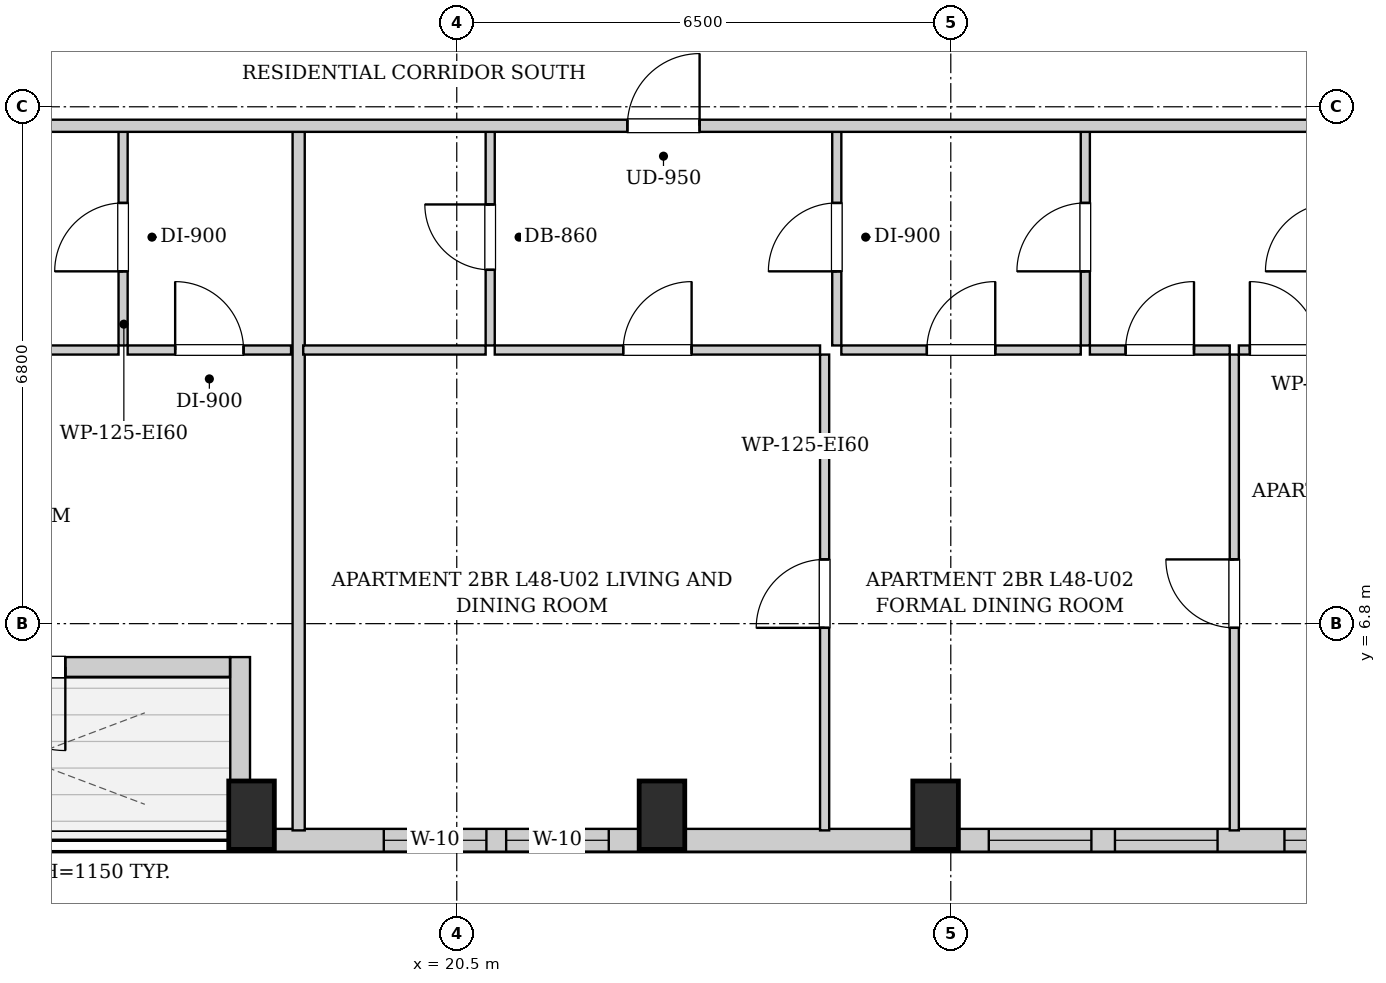
"""IFC4 building model, lengths in metres.
Left out: names, types, materials, properties, quantities, classifications, styles, units other than length and angle.
Written with IfcOpenShell. Run it as: python <this file> out.ifc"""

import sys

from ifc_helpers import new_model, si_unit, direction, frame, frame_2d, origin, origin_2d, place, context, subcontext, project, spatial, rectangle, extrude, element, fill, save


model = new_model("IFC4")
c1 = context("Model", 3, precision=1e-05, world=origin(), true_north=direction((0.0, 1.0)))
c2 = subcontext(c1, "Body", "Model", "MODEL_VIEW")
j1 = project(units=[si_unit("LENGTHUNIT", "METRE"), si_unit("PLANEANGLEUNIT", "RADIAN")], contexts=[c1])
p1 = place(None, origin())
s1 = spatial("IfcSite", under=j1, at=p1, CompositionType="ELEMENT")
p2 = place(p1, origin())
s2 = spatial("IfcBuilding", under=s1, at=p2, CompositionType="ELEMENT")
p3 = place(p2, frame((0.0, 0.0, 166.65)))
s3 = spatial("IfcBuildingStorey", under=s2, at=p3, CompositionType="ELEMENT", Elevation=166.65)
for number, where, z_axis, x_axis in (
    (1, (17.8, 4.28, 0.0), (0.0, 0.0, 1.0), (1.0, 0.0, 0.0)),
    (2, (23.2, 4.28, 0.0), (0.0, 0.0, 1.0), (1.0, 0.0, 0.0)),
    (3, (26.8, 4.28, 0.0), (0.0, 0.0, 1.0), (1.0, 0.0, 0.0)),
):
    element("IfcColumn", number, at=place(p3, frame(where, z_axis=z_axis, x_axis=x_axis)), inside=s3, PredefinedType="COLUMN", context=c2, shape_type="SweptSolid", body=[
        extrude(rectangle(XDim=0.6, YDim=0.9, at=origin_2d()), origin(), (0.0, 0.0, 1.0), 3.25),
    ])
p4 = place(p3, frame((37.8, 3.95, 0.0), z_axis=(0.0, 0.0, 1.0), x_axis=(-1.0, 0.0, 0.0)))
e4 = element("IfcWall", 4, at=p4, inside=s3, PredefinedType="SOLIDWALL", context=c2, shape_type="SweptSolid", body=[
    extrude(rectangle(XDim=20.15, YDim=0.3, at=frame_2d((10.075, 0.0))), origin(), (0.0, 0.0, 1.0), 2.93),
])
p5 = place(p4, frame((15.3, 0.0, 0.55)))
e5 = element("IfcOpeningElement", 5, at=p5, cuts=e4, PredefinedType="OPENING", context=c2, shape_type="SweptSolid", body=[
    extrude(rectangle(XDim=1.35, YDim=1.2, at=frame_2d((0.675, 0.6))), frame((0.0, 0.16, 0.0), z_axis=(0.0, -1.0, 0.0), x_axis=(1.0, 0.0, 0.0)), (0.0, 0.0, 1.0), 0.32),
])
p6 = place(p4, frame((16.91, 0.0, 0.55)))
e6 = element("IfcOpeningElement", 6, at=p6, cuts=e4, PredefinedType="OPENING", context=c2, shape_type="SweptSolid", body=[
    extrude(rectangle(XDim=1.35, YDim=1.2, at=frame_2d((0.675, 0.6))), frame((0.0, 0.16, 0.0), z_axis=(0.0, -1.0, 0.0), x_axis=(1.0, 0.0, 0.0)), (0.0, 0.0, 1.0), 0.32),
])
p7 = place(p4, frame((8.95, 0.0, 0.55)))
e7 = element("IfcOpeningElement", 7, at=p7, cuts=e4, PredefinedType="OPENING", context=c2, shape_type="SweptSolid", body=[
    extrude(rectangle(XDim=1.35, YDim=1.2, at=frame_2d((0.675, 0.6))), frame((0.0, 0.16, 0.0), z_axis=(0.0, -1.0, 0.0), x_axis=(1.0, 0.0, 0.0)), (0.0, 0.0, 1.0), 0.32),
])
p8 = place(p4, frame((7.29, 0.0, 0.55)))
e8 = element("IfcOpeningElement", 8, at=p8, cuts=e4, PredefinedType="OPENING", context=c2, shape_type="SweptSolid", body=[
    extrude(rectangle(XDim=1.35, YDim=1.2, at=frame_2d((0.675, 0.6))), frame((0.0, 0.16, 0.0), z_axis=(0.0, -1.0, 0.0), x_axis=(1.0, 0.0, 0.0)), (0.0, 0.0, 1.0), 0.32),
])
p9 = place(p4, frame((5.06, 0.0, 0.55)))
e9 = element("IfcOpeningElement", 9, at=p9, cuts=e4, PredefinedType="OPENING", context=c2, shape_type="SweptSolid", body=[
    extrude(rectangle(XDim=1.35, YDim=1.2, at=frame_2d((0.675, 0.6))), frame((0.0, 0.16, 0.0), z_axis=(0.0, -1.0, 0.0), x_axis=(1.0, 0.0, 0.0)), (0.0, 0.0, 1.0), 0.32),
])
p10 = place(p3, frame((17.65, 3.96, 0.0), z_axis=(0.0, 0.0, 1.0), x_axis=(0.0, 1.0, 0.0)))
e10 = element("IfcWall", 10, at=p10, inside=s3, PredefinedType="SOLIDWALL", context=c2, shape_type="SweptSolid", body=[
    extrude(rectangle(XDim=2.4, YDim=0.26, at=frame_2d((1.2, 0.0))), origin(), (0.0, 0.0, 1.0), 2.93),
])
p11 = place(p3, frame((17.516, 6.23, 0.0), z_axis=(0.0, 0.0, 1.0), x_axis=(-1.0, 0.0, 0.0)))
e11 = element("IfcWall", 11, at=p11, inside=s3, PredefinedType="SOLIDWALL", context=c2, shape_type="SweptSolid", body=[
    extrude(rectangle(XDim=5.432, YDim=0.26, at=frame_2d((2.716, 0.0))), origin(), (0.0, 0.0, 1.0), 2.93),
])
p12 = place(p11, frame((2.166, 0.0, 0.0)))
e12 = element("IfcOpeningElement", 12, at=p12, cuts=e11, PredefinedType="OPENING", context=c2, shape_type="SweptSolid", body=[
    extrude(rectangle(XDim=1.1, YDim=2.0, at=frame_2d((0.55, 1.0))), frame((0.0, 0.14, 0.0), z_axis=(0.0, -1.0, 0.0), x_axis=(1.0, 0.0, 0.0)), (0.0, 0.0, 1.0), 0.28),
])
p13 = place(p3, frame((16.11, 10.46, 0.0), z_axis=(0.0, 0.0, 1.0), x_axis=(0.0, 1.0, 0.0)))
e13 = element("IfcWall", 13, at=p13, inside=s3, PredefinedType="PARTITIONING", context=c2, shape_type="SweptSolid", body=[
    extrude(rectangle(XDim=2.85, YDim=0.12, at=frame_2d((1.425, 0.0))), origin(), (0.0, 0.0, 1.0), 2.93),
])
p14 = place(p13, frame((0.975, 0.0, 0.0)))
e14 = element("IfcOpeningElement", 14, at=p14, cuts=e13, PredefinedType="OPENING", context=c2, shape_type="SweptSolid", body=[
    extrude(rectangle(XDim=0.9, YDim=2.05, at=frame_2d((0.45, 1.025))), frame((0.0, 0.07, 0.0), z_axis=(0.0, -1.0, 0.0), x_axis=(1.0, 0.0, 0.0)), (0.0, 0.0, 1.0), 0.14),
])
p15 = place(p3, frame((12.6, 10.4, 0.0), z_axis=(0.0, 0.0, 1.0), x_axis=(1.0, 0.0, 0.0)))
e15 = element("IfcWall", 15, at=p15, inside=s3, PredefinedType="PARTITIONING", context=c2, shape_type="SweptSolid", body=[
    extrude(rectangle(XDim=3.45, YDim=0.12, at=frame_2d((1.725, 0.0))), origin(), (0.0, 0.0, 1.0), 2.93),
])
p16 = place(p15, frame((1.275, 0.0, 0.0)))
e16 = element("IfcOpeningElement", 16, at=p16, cuts=e15, PredefinedType="OPENING", context=c2, shape_type="SweptSolid", body=[
    extrude(rectangle(XDim=0.9, YDim=2.05, at=frame_2d((0.45, 1.025))), frame((0.0, 0.07, 0.0), z_axis=(0.0, -1.0, 0.0), x_axis=(1.0, 0.0, 0.0)), (0.0, 0.0, 1.0), 0.14),
])
p17 = place(p3, frame((16.17, 10.4, 0.0), z_axis=(0.0, 0.0, 1.0), x_axis=(1.0, 0.0, 0.0)))
e17 = element("IfcWall", 17, at=p17, inside=s3, PredefinedType="PARTITIONING", context=c2, shape_type="SweptSolid", body=[
    extrude(rectangle(XDim=2.15, YDim=0.12, at=frame_2d((1.075, 0.0))), origin(), (0.0, 0.0, 1.0), 2.93),
])
p18 = place(p17, frame((0.625, 0.0, 0.0)))
e18 = element("IfcOpeningElement", 18, at=p18, cuts=e17, PredefinedType="OPENING", context=c2, shape_type="SweptSolid", body=[
    extrude(rectangle(XDim=0.9, YDim=2.05, at=frame_2d((0.45, 1.025))), frame((0.0, 0.07, 0.0), z_axis=(0.0, -1.0, 0.0), x_axis=(1.0, 0.0, 0.0)), (0.0, 0.0, 1.0), 0.14),
])
p19 = place(p3, frame((18.42, 4.08, 0.0), z_axis=(0.0, 0.0, 1.0), x_axis=(0.0, 1.0, 0.0)))
e19 = element("IfcWall", 19, at=p19, inside=s3, PredefinedType="PARTITIONING", context=c2, shape_type="SweptSolid", body=[
    extrude(rectangle(XDim=9.23, YDim=0.16, at=frame_2d((4.615, 0.0))), origin(), (0.0, 0.0, 1.0), 2.93),
])
p20 = place(p3, frame((20.94, 10.46, 0.0), z_axis=(0.0, 0.0, 1.0), x_axis=(0.0, 1.0, 0.0)))
e20 = element("IfcWall", 20, at=p20, inside=s3, PredefinedType="PARTITIONING", context=c2, shape_type="SweptSolid", body=[
    extrude(rectangle(XDim=2.85, YDim=0.12, at=frame_2d((1.425, 0.0))), origin(), (0.0, 0.0, 1.0), 2.93),
])
p21 = place(p20, frame((0.995, 0.0, 0.0)))
e21 = element("IfcOpeningElement", 21, at=p21, cuts=e20, PredefinedType="OPENING", context=c2, shape_type="SweptSolid", body=[
    extrude(rectangle(XDim=0.86, YDim=2.05, at=frame_2d((0.43, 1.025))), frame((0.0, 0.07, 0.0), z_axis=(0.0, -1.0, 0.0), x_axis=(1.0, 0.0, 0.0)), (0.0, 0.0, 1.0), 0.14),
])
p22 = place(p3, frame((18.48, 10.4, 0.0), z_axis=(0.0, 0.0, 1.0), x_axis=(1.0, 0.0, 0.0)))
e22 = element("IfcWall", 22, at=p22, inside=s3, PredefinedType="PARTITIONING", context=c2, shape_type="SweptSolid", body=[
    extrude(rectangle(XDim=2.4, YDim=0.12, at=frame_2d((1.2, 0.0))), origin(), (0.0, 0.0, 1.0), 2.93),
])
p23 = place(p3, frame((25.5, 10.46, 0.0), z_axis=(0.0, 0.0, 1.0), x_axis=(0.0, 1.0, 0.0)))
e23 = element("IfcWall", 23, at=p23, inside=s3, PredefinedType="PARTITIONING", context=c2, shape_type="SweptSolid", body=[
    extrude(rectangle(XDim=2.85, YDim=0.12, at=frame_2d((1.425, 0.0))), origin(), (0.0, 0.0, 1.0), 2.93),
])
p24 = place(p23, frame((0.975, 0.0, 0.0)))
e24 = element("IfcOpeningElement", 24, at=p24, cuts=e23, PredefinedType="OPENING", context=c2, shape_type="SweptSolid", body=[
    extrude(rectangle(XDim=0.9, YDim=2.05, at=frame_2d((0.45, 1.025))), frame((0.0, 0.07, 0.0), z_axis=(0.0, -1.0, 0.0), x_axis=(1.0, 0.0, 0.0)), (0.0, 0.0, 1.0), 0.14),
])
p25 = place(p3, frame((21.0, 10.4, 0.0), z_axis=(0.0, 0.0, 1.0), x_axis=(1.0, 0.0, 0.0)))
e25 = element("IfcWall", 25, at=p25, inside=s3, PredefinedType="PARTITIONING", context=c2, shape_type="SweptSolid", body=[
    extrude(rectangle(XDim=4.28, YDim=0.12, at=frame_2d((2.14, 0.0))), origin(), (0.0, 0.0, 1.0), 2.93),
])
p26 = place(p25, frame((1.69, 0.0, 0.0)))
e26 = element("IfcOpeningElement", 26, at=p26, cuts=e25, PredefinedType="OPENING", context=c2, shape_type="SweptSolid", body=[
    extrude(rectangle(XDim=0.9, YDim=2.05, at=frame_2d((0.45, 1.025))), frame((0.0, 0.07, 0.0), z_axis=(0.0, -1.0, 0.0), x_axis=(1.0, 0.0, 0.0)), (0.0, 0.0, 1.0), 0.14),
])
p27 = place(p3, frame((28.77, 10.46, 0.0), z_axis=(0.0, 0.0, 1.0), x_axis=(0.0, 1.0, 0.0)))
e27 = element("IfcWall", 27, at=p27, inside=s3, PredefinedType="PARTITIONING", context=c2, shape_type="SweptSolid", body=[
    extrude(rectangle(XDim=2.85, YDim=0.12, at=frame_2d((1.425, 0.0))), origin(), (0.0, 0.0, 1.0), 2.93),
])
p28 = place(p27, frame((0.975, 0.0, 0.0)))
e28 = element("IfcOpeningElement", 28, at=p28, cuts=e27, PredefinedType="OPENING", context=c2, shape_type="SweptSolid", body=[
    extrude(rectangle(XDim=0.9, YDim=2.05, at=frame_2d((0.45, 1.025))), frame((0.0, 0.07, 0.0), z_axis=(0.0, -1.0, 0.0), x_axis=(1.0, 0.0, 0.0)), (0.0, 0.0, 1.0), 0.14),
])
p29 = place(p3, frame((25.56, 10.4, 0.0), z_axis=(0.0, 0.0, 1.0), x_axis=(1.0, 0.0, 0.0)))
e29 = element("IfcWall", 29, at=p29, inside=s3, PredefinedType="PARTITIONING", context=c2, shape_type="SweptSolid", body=[
    extrude(rectangle(XDim=3.15, YDim=0.12, at=frame_2d((1.575, 0.0))), origin(), (0.0, 0.0, 1.0), 2.93),
])
p30 = place(p29, frame((1.125, 0.0, 0.0)))
e30 = element("IfcOpeningElement", 30, at=p30, cuts=e29, PredefinedType="OPENING", context=c2, shape_type="SweptSolid", body=[
    extrude(rectangle(XDim=0.9, YDim=2.05, at=frame_2d((0.45, 1.025))), frame((0.0, 0.07, 0.0), z_axis=(0.0, -1.0, 0.0), x_axis=(1.0, 0.0, 0.0)), (0.0, 0.0, 1.0), 0.14),
])
p31 = place(p3, frame((28.83, 10.4, 0.0), z_axis=(0.0, 0.0, 1.0), x_axis=(1.0, 0.0, 0.0)))
e31 = element("IfcWall", 31, at=p31, inside=s3, PredefinedType="PARTITIONING", context=c2, shape_type="SweptSolid", body=[
    extrude(rectangle(XDim=1.84, YDim=0.12, at=frame_2d((0.92, 0.0))), origin(), (0.0, 0.0, 1.0), 2.93),
])
p32 = place(p31, frame((0.47, 0.0, 0.0)))
e32 = element("IfcOpeningElement", 32, at=p32, cuts=e31, PredefinedType="OPENING", context=c2, shape_type="SweptSolid", body=[
    extrude(rectangle(XDim=0.9, YDim=2.05, at=frame_2d((0.45, 1.025))), frame((0.0, 0.07, 0.0), z_axis=(0.0, -1.0, 0.0), x_axis=(1.0, 0.0, 0.0)), (0.0, 0.0, 1.0), 0.14),
])
p33 = place(p3, frame((30.79, 10.4, 0.0), z_axis=(0.0, 0.0, 1.0), x_axis=(1.0, 0.0, 0.0)))
e33 = element("IfcWall", 33, at=p33, inside=s3, PredefinedType="PARTITIONING", context=c2, shape_type="SweptSolid", body=[
    extrude(rectangle(XDim=1.19, YDim=0.12, at=frame_2d((0.595, 0.0))), origin(), (0.0, 0.0, 1.0), 2.93),
])
p34 = place(p33, frame((0.145, 0.0, 0.0)))
e34 = element("IfcOpeningElement", 34, at=p34, cuts=e33, PredefinedType="OPENING", context=c2, shape_type="SweptSolid", body=[
    extrude(rectangle(XDim=0.9, YDim=2.05, at=frame_2d((0.45, 1.025))), frame((0.0, 0.07, 0.0), z_axis=(0.0, -1.0, 0.0), x_axis=(1.0, 0.0, 0.0)), (0.0, 0.0, 1.0), 0.14),
])
p35 = place(p3, frame((25.34, 4.08, 0.0), z_axis=(0.0, 0.0, 1.0), x_axis=(0.0, 1.0, 0.0)))
e35 = element("IfcWall", 35, at=p35, inside=s3, PredefinedType="PARTITIONING", context=c2, shape_type="SweptSolid", body=[
    extrude(rectangle(XDim=6.26, YDim=0.12, at=frame_2d((3.13, 0.0))), origin(), (0.0, 0.0, 1.0), 2.93),
])
p36 = place(p35, frame((2.665, 0.0, 0.0)))
e36 = element("IfcOpeningElement", 36, at=p36, cuts=e35, PredefinedType="OPENING", context=c2, shape_type="SweptSolid", body=[
    extrude(rectangle(XDim=0.9, YDim=2.05, at=frame_2d((0.45, 1.025))), frame((0.0, 0.07, 0.0), z_axis=(0.0, -1.0, 0.0), x_axis=(1.0, 0.0, 0.0)), (0.0, 0.0, 1.0), 0.14),
])
p37 = place(p3, frame((30.73, 4.08, 0.0), z_axis=(0.0, 0.0, 1.0), x_axis=(0.0, 1.0, 0.0)))
e37 = element("IfcWall", 37, at=p37, inside=s3, PredefinedType="PARTITIONING", context=c2, shape_type="SweptSolid", body=[
    extrude(rectangle(XDim=6.26, YDim=0.12, at=frame_2d((3.13, 0.0))), origin(), (0.0, 0.0, 1.0), 2.93),
])
p38 = place(p37, frame((2.665, 0.0, 0.0)))
e38 = element("IfcOpeningElement", 38, at=p38, cuts=e37, PredefinedType="OPENING", context=c2, shape_type="SweptSolid", body=[
    extrude(rectangle(XDim=0.9, YDim=2.05, at=frame_2d((0.45, 1.025))), frame((0.0, 0.07, 0.0), z_axis=(0.0, -1.0, 0.0), x_axis=(1.0, 0.0, 0.0)), (0.0, 0.0, 1.0), 0.14),
])
p39 = place(p3, frame((10.05, 13.35, 0.0), z_axis=(0.0, 0.0, 1.0), x_axis=(1.0, 0.0, 0.0)))
e39 = element("IfcWall", 39, at=p39, inside=s3, PredefinedType="PARTITIONING", context=c2, shape_type="SweptSolid", body=[
    extrude(rectangle(XDim=27.7, YDim=0.16, at=frame_2d((13.85, 0.0))), origin(), (0.0, 0.0, 1.0), 2.93),
])
p40 = place(p39, frame((3.8, 0.0, 0.0)))
e40 = element("IfcOpeningElement", 40, at=p40, cuts=e39, PredefinedType="OPENING", context=c2, shape_type="SweptSolid", body=[
    extrude(rectangle(XDim=0.95, YDim=2.1, at=frame_2d((0.475, 1.05))), frame((0.0, 0.09, 0.0), z_axis=(0.0, -1.0, 0.0), x_axis=(1.0, 0.0, 0.0)), (0.0, 0.0, 1.0), 0.18),
])
p41 = place(p39, frame((12.695, 0.0, 0.0)))
e41 = element("IfcOpeningElement", 41, at=p41, cuts=e39, PredefinedType="OPENING", context=c2, shape_type="SweptSolid", body=[
    extrude(rectangle(XDim=0.95, YDim=2.1, at=frame_2d((0.475, 1.05))), frame((0.0, 0.09, 0.0), z_axis=(0.0, -1.0, 0.0), x_axis=(1.0, 0.0, 0.0)), (0.0, 0.0, 1.0), 0.18),
])
p42 = place(p14, origin())
e42 = element("IfcDoor", 42, at=p42, inside=s3, OperationType="SINGLE_SWING_LEFT", PredefinedType="DOOR", context=c2, shape_type="SweptSolid", body=[
    extrude(rectangle(XDim=0.9, YDim=2.05, at=frame_2d((0.45, 1.025))), frame((0.0, 0.025, 0.0), z_axis=(0.0, -1.0, 0.0), x_axis=(1.0, 0.0, 0.0)), (0.0, 0.0, 1.0), 0.05),
])
fill(e14, e42)
p43 = place(p18, origin())
e43 = element("IfcDoor", 43, at=p43, inside=s3, OperationType="SINGLE_SWING_LEFT", PredefinedType="DOOR", context=c2, shape_type="SweptSolid", body=[
    extrude(rectangle(XDim=0.9, YDim=2.05, at=frame_2d((0.45, 1.025))), frame((0.0, 0.025, 0.0), z_axis=(0.0, -1.0, 0.0), x_axis=(1.0, 0.0, 0.0)), (0.0, 0.0, 1.0), 0.05),
])
fill(e18, e43)
p44 = place(p21, origin())
e44 = element("IfcDoor", 44, at=p44, inside=s3, OperationType="SINGLE_SWING_RIGHT", PredefinedType="DOOR", context=c2, shape_type="SweptSolid", body=[
    extrude(rectangle(XDim=0.86, YDim=2.05, at=frame_2d((0.43, 1.025))), frame((0.0, 0.025, 0.0), z_axis=(0.0, -1.0, 0.0), x_axis=(1.0, 0.0, 0.0)), (0.0, 0.0, 1.0), 0.05),
])
fill(e21, e44)
p45 = place(p24, origin())
e45 = element("IfcDoor", 45, at=p45, inside=s3, OperationType="SINGLE_SWING_LEFT", PredefinedType="DOOR", context=c2, shape_type="SweptSolid", body=[
    extrude(rectangle(XDim=0.9, YDim=2.05, at=frame_2d((0.45, 1.025))), frame((0.0, 0.025, 0.0), z_axis=(0.0, -1.0, 0.0), x_axis=(1.0, 0.0, 0.0)), (0.0, 0.0, 1.0), 0.05),
])
fill(e24, e45)
p46 = place(p26, origin())
e46 = element("IfcDoor", 46, at=p46, inside=s3, OperationType="SINGLE_SWING_RIGHT", PredefinedType="DOOR", context=c2, shape_type="SweptSolid", body=[
    extrude(rectangle(XDim=0.9, YDim=2.05, at=frame_2d((0.45, 1.025))), frame((0.0, 0.025, 0.0), z_axis=(0.0, -1.0, 0.0), x_axis=(1.0, 0.0, 0.0)), (0.0, 0.0, 1.0), 0.05),
])
fill(e26, e46)
p47 = place(p28, origin())
e47 = element("IfcDoor", 47, at=p47, inside=s3, OperationType="SINGLE_SWING_LEFT", PredefinedType="DOOR", context=c2, shape_type="SweptSolid", body=[
    extrude(rectangle(XDim=0.9, YDim=2.05, at=frame_2d((0.45, 1.025))), frame((0.0, 0.025, 0.0), z_axis=(0.0, -1.0, 0.0), x_axis=(1.0, 0.0, 0.0)), (0.0, 0.0, 1.0), 0.05),
])
fill(e28, e47)
p48 = place(p30, origin())
e48 = element("IfcDoor", 48, at=p48, inside=s3, OperationType="SINGLE_SWING_RIGHT", PredefinedType="DOOR", context=c2, shape_type="SweptSolid", body=[
    extrude(rectangle(XDim=0.9, YDim=2.05, at=frame_2d((0.45, 1.025))), frame((0.0, 0.025, 0.0), z_axis=(0.0, -1.0, 0.0), x_axis=(1.0, 0.0, 0.0)), (0.0, 0.0, 1.0), 0.05),
])
fill(e30, e48)
p49 = place(p32, origin())
e49 = element("IfcDoor", 49, at=p49, inside=s3, OperationType="SINGLE_SWING_RIGHT", PredefinedType="DOOR", context=c2, shape_type="SweptSolid", body=[
    extrude(rectangle(XDim=0.9, YDim=2.05, at=frame_2d((0.45, 1.025))), frame((0.0, 0.025, 0.0), z_axis=(0.0, -1.0, 0.0), x_axis=(1.0, 0.0, 0.0)), (0.0, 0.0, 1.0), 0.05),
])
fill(e32, e49)
p50 = place(p34, origin())
e50 = element("IfcDoor", 50, at=p50, inside=s3, OperationType="SINGLE_SWING_LEFT", PredefinedType="DOOR", context=c2, shape_type="SweptSolid", body=[
    extrude(rectangle(XDim=0.9, YDim=2.05, at=frame_2d((0.45, 1.025))), frame((0.0, 0.025, 0.0), z_axis=(0.0, -1.0, 0.0), x_axis=(1.0, 0.0, 0.0)), (0.0, 0.0, 1.0), 0.05),
])
fill(e34, e50)
p51 = place(p36, origin())
e51 = element("IfcDoor", 51, at=p51, inside=s3, OperationType="SINGLE_SWING_LEFT", PredefinedType="DOOR", context=c2, shape_type="SweptSolid", body=[
    extrude(rectangle(XDim=0.9, YDim=2.05, at=frame_2d((0.45, 1.025))), frame((0.0, 0.025, 0.0), z_axis=(0.0, -1.0, 0.0), x_axis=(1.0, 0.0, 0.0)), (0.0, 0.0, 1.0), 0.05),
])
fill(e36, e51)
p52 = place(p38, origin())
e52 = element("IfcDoor", 52, at=p52, inside=s3, OperationType="SINGLE_SWING_RIGHT", PredefinedType="DOOR", context=c2, shape_type="SweptSolid", body=[
    extrude(rectangle(XDim=0.9, YDim=2.05, at=frame_2d((0.45, 1.025))), frame((0.0, 0.025, 0.0), z_axis=(0.0, -1.0, 0.0), x_axis=(1.0, 0.0, 0.0)), (0.0, 0.0, 1.0), 0.05),
])
fill(e38, e52)
p53 = place(p41, origin())
e53 = element("IfcDoor", 53, at=p53, inside=s3, OperationType="SINGLE_SWING_RIGHT", PredefinedType="DOOR", context=c2, shape_type="SweptSolid", body=[
    extrude(rectangle(XDim=0.95, YDim=2.1, at=frame_2d((0.475, 1.05))), frame((0.0, 0.025, 0.0), z_axis=(0.0, -1.0, 0.0), x_axis=(1.0, 0.0, 0.0)), (0.0, 0.0, 1.0), 0.05),
])
fill(e41, e53)
p54 = place(p12, origin())
e54 = element("IfcDoor", 54, at=p54, inside=s3, OperationType="SINGLE_SWING_LEFT", PredefinedType="DOOR", context=c2, shape_type="SweptSolid", body=[
    extrude(rectangle(XDim=1.1, YDim=2.0, at=frame_2d((0.55, 1.0))), frame((0.0, 0.025, 0.0), z_axis=(0.0, -1.0, 0.0), x_axis=(1.0, 0.0, 0.0)), (0.0, 0.0, 1.0), 0.05),
])
fill(e12, e54)
p55 = place(p5, origin())
e55 = element("IfcWindow", 55, at=p55, inside=s3, PartitioningType="SINGLE_PANEL", PredefinedType="WINDOW", context=c2, shape_type="SweptSolid", body=[
    extrude(rectangle(XDim=1.35, YDim=1.2, at=frame_2d((0.675, 0.6))), frame((0.0, 0.03, 0.0), z_axis=(0.0, -1.0, 0.0), x_axis=(1.0, 0.0, 0.0)), (0.0, 0.0, 1.0), 0.06),
])
fill(e5, e55)
p56 = place(p6, origin())
e56 = element("IfcWindow", 56, at=p56, inside=s3, PartitioningType="SINGLE_PANEL", PredefinedType="WINDOW", context=c2, shape_type="SweptSolid", body=[
    extrude(rectangle(XDim=1.35, YDim=1.2, at=frame_2d((0.675, 0.6))), frame((0.0, 0.03, 0.0), z_axis=(0.0, -1.0, 0.0), x_axis=(1.0, 0.0, 0.0)), (0.0, 0.0, 1.0), 0.06),
])
fill(e6, e56)
p57 = place(p7, origin())
e57 = element("IfcWindow", 57, at=p57, inside=s3, PartitioningType="SINGLE_PANEL", PredefinedType="WINDOW", context=c2, shape_type="SweptSolid", body=[
    extrude(rectangle(XDim=1.35, YDim=1.2, at=frame_2d((0.675, 0.6))), frame((0.0, 0.03, 0.0), z_axis=(0.0, -1.0, 0.0), x_axis=(1.0, 0.0, 0.0)), (0.0, 0.0, 1.0), 0.06),
])
fill(e7, e57)
p58 = place(p8, origin())
e58 = element("IfcWindow", 58, at=p58, inside=s3, PartitioningType="SINGLE_PANEL", PredefinedType="WINDOW", context=c2, shape_type="SweptSolid", body=[
    extrude(rectangle(XDim=1.35, YDim=1.2, at=frame_2d((0.675, 0.6))), frame((0.0, 0.03, 0.0), z_axis=(0.0, -1.0, 0.0), x_axis=(1.0, 0.0, 0.0)), (0.0, 0.0, 1.0), 0.06),
])
fill(e8, e58)
p59 = place(p9, origin())
e59 = element("IfcWindow", 59, at=p59, inside=s3, PartitioningType="SINGLE_PANEL", PredefinedType="WINDOW", context=c2, shape_type="SweptSolid", body=[
    extrude(rectangle(XDim=1.35, YDim=1.2, at=frame_2d((0.675, 0.6))), frame((0.0, 0.03, 0.0), z_axis=(0.0, -1.0, 0.0), x_axis=(1.0, 0.0, 0.0)), (0.0, 0.0, 1.0), 0.06),
])
fill(e9, e59)
save(model, sys.argv[1])
